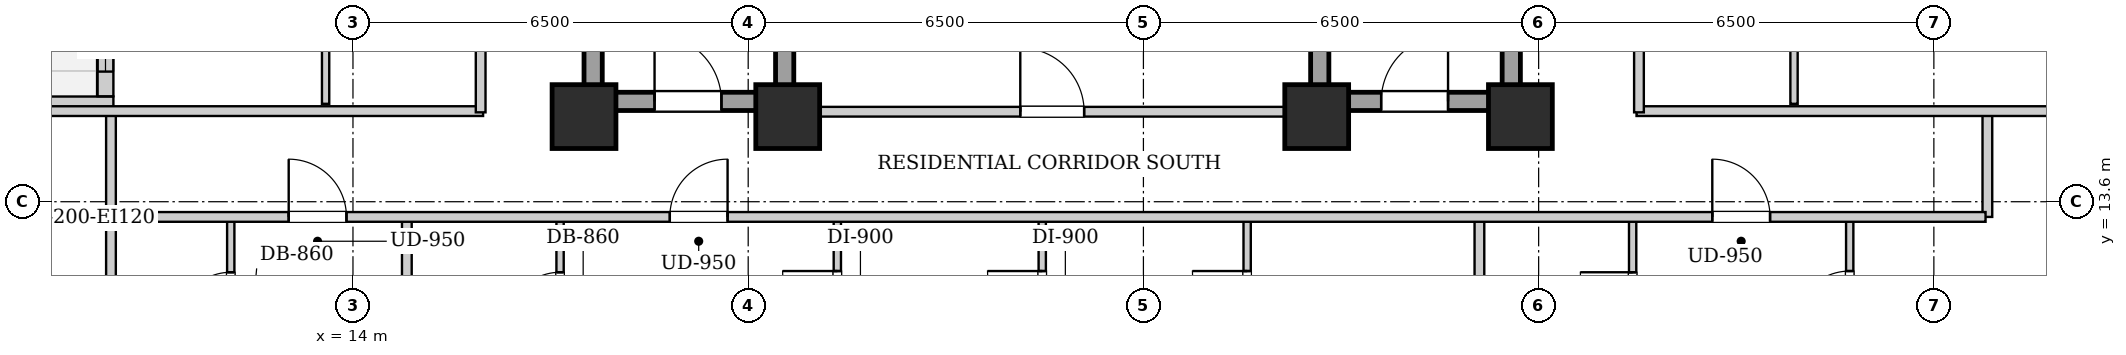
"""IFC4 building model, lengths in metres.
Left out: names, types, materials, properties, quantities, classifications, styles, units other than length and angle.
Written with IfcOpenShell. Run it as: python <this file> out.ifc"""

import sys

from ifc_helpers import new_model, si_unit, direction, frame, frame_2d, origin, origin_2d, place, context, subcontext, project, spatial, rectangle, extrude, element, fill, save


model = new_model("IFC4")
c1 = context("Model", 3, precision=1e-05, world=origin(), true_north=direction((0.0, 1.0)))
c2 = subcontext(c1, "Body", "Model", "MODEL_VIEW")
j1 = project(units=[si_unit("LENGTHUNIT", "METRE"), si_unit("PLANEANGLEUNIT", "RADIAN")], contexts=[c1])
p1 = place(None, origin())
s1 = spatial("IfcSite", under=j1, at=p1, CompositionType="ELEMENT")
p2 = place(p1, origin())
s2 = spatial("IfcBuilding", under=s1, at=p2, CompositionType="ELEMENT")
p3 = place(p2, frame((0.0, 0.0, 103.9)))
s3 = spatial("IfcBuildingStorey", under=s2, at=p3, CompositionType="ELEMENT", Elevation=103.9)
for number, where, z_axis, x_axis in (
    (1, (17.8, 15.0, 0.0), (0.0, 0.0, 1.0), (1.0, 0.0, 0.0)),
    (2, (21.15, 15.0, 0.0), (0.0, 0.0, 1.0), (1.0, 0.0, 0.0)),
    (3, (29.85, 15.0, 0.0), (0.0, 0.0, 1.0), (1.0, 0.0, 0.0)),
    (4, (33.2, 15.0, 0.0), (0.0, 0.0, 1.0), (1.0, 0.0, 0.0)),
):
    element("IfcColumn", number, at=place(p3, frame(where, z_axis=z_axis, x_axis=x_axis)), inside=s3, PredefinedType="COLUMN", context=c2, shape_type="SweptSolid", body=[
        extrude(rectangle(XDim=1.05, YDim=1.05, at=origin_2d()), origin(), (0.0, 0.0, 1.0), 3.2),
    ])
p4 = place(p3, frame((7.66, 15.2, 0.0), z_axis=(0.0, 0.0, 1.0), x_axis=(1.0, 0.0, 0.0)))
e5 = element("IfcWall", 5, at=p4, inside=s3, PredefinedType="SOLIDWALL", context=c2, shape_type="SweptSolid", body=[
    extrude(rectangle(XDim=2.4, YDim=0.26, at=frame_2d((1.2, 0.0))), origin(), (0.0, 0.0, 1.0), 2.94),
])
p5 = place(p3, frame((9.93, 15.334, 0.0), z_axis=(0.0, 0.0, 1.0), x_axis=(0.0, 1.0, 0.0)))
e6 = element("IfcWall", 6, at=p5, inside=s3, PredefinedType="SOLIDWALL", context=c2, shape_type="SweptSolid", body=[
    extrude(rectangle(XDim=3.932, YDim=0.26, at=frame_2d((1.966, 0.0))), origin(), (0.0, 0.0, 1.0), 2.94),
])
p6 = place(p5, frame((1.416, 0.0, 0.0)))
e7 = element("IfcOpeningElement", 7, at=p6, cuts=e6, PredefinedType="OPENING", context=c2, shape_type="SweptSolid", body=[
    extrude(rectangle(XDim=1.1, YDim=2.0, at=frame_2d((0.55, 1.0))), frame((0.0, 0.14, 0.0), z_axis=(0.0, -1.0, 0.0), x_axis=(1.0, 0.0, 0.0)), (0.0, 0.0, 1.0), 0.28),
])
p7 = place(p5, frame((0.406, 0.0, 0.55)))
e8 = element("IfcOpeningElement", 8, at=p7, cuts=e6, PredefinedType="OPENING", context=c2, shape_type="SweptSolid", body=[
    extrude(rectangle(XDim=0.85, YDim=1.2, at=frame_2d((0.425, 0.6))), frame((0.0, 0.14, 0.0), z_axis=(0.0, -1.0, 0.0), x_axis=(1.0, 0.0, 0.0)), (0.0, 0.0, 1.0), 0.28),
])
for number, where, z_axis, x_axis in (
    (9, (17.95, 15.1, 0.0), (0.0, 0.0, 1.0), (0.0, 1.0, 0.0)),
    (10, (21.1, 15.1, 0.0), (0.0, 0.0, 1.0), (0.0, 1.0, 0.0)),
):
    element("IfcWall", number, at=place(p3, frame(where, z_axis=z_axis, x_axis=x_axis)), inside=s3, PredefinedType="SHEAR", context=c2, shape_type="SweptSolid", body=[
        extrude(rectangle(XDim=9.0, YDim=0.3, at=frame_2d((4.5, 0.0))), origin(), (0.0, 0.0, 1.0), 2.94),
    ])
p8 = place(p3, frame((18.1, 15.25, 0.0), z_axis=(0.0, 0.0, 1.0), x_axis=(1.0, 0.0, 0.0)))
e11 = element("IfcWall", 11, at=p8, inside=s3, PredefinedType="SHEAR", context=c2, shape_type="SweptSolid", body=[
    extrude(rectangle(XDim=2.85, YDim=0.3, at=frame_2d((1.425, 0.0))), origin(), (0.0, 0.0, 1.0), 2.94),
])
p9 = place(p8, frame((0.86, 0.0, 0.0)))
e12 = element("IfcOpeningElement", 12, at=p9, cuts=e11, PredefinedType="OPENING", context=c2, shape_type="SweptSolid", body=[
    extrude(rectangle(XDim=1.1, YDim=2.05, at=frame_2d((0.55, 1.025))), frame((0.0, 0.16, 0.0), z_axis=(0.0, -1.0, 0.0), x_axis=(1.0, 0.0, 0.0)), (0.0, 0.0, 1.0), 0.32),
])
for number, where, z_axis, x_axis in (
    (13, (29.9, 15.1, 0.0), (0.0, 0.0, 1.0), (0.0, 1.0, 0.0)),
    (14, (33.05, 15.1, 0.0), (0.0, 0.0, 1.0), (0.0, 1.0, 0.0)),
):
    element("IfcWall", number, at=place(p3, frame(where, z_axis=z_axis, x_axis=x_axis)), inside=s3, PredefinedType="SHEAR", context=c2, shape_type="SweptSolid", body=[
        extrude(rectangle(XDim=9.0, YDim=0.3, at=frame_2d((4.5, 0.0))), origin(), (0.0, 0.0, 1.0), 2.94),
    ])
p10 = place(p3, frame((30.05, 15.25, 0.0), z_axis=(0.0, 0.0, 1.0), x_axis=(1.0, 0.0, 0.0)))
e15 = element("IfcWall", 15, at=p10, inside=s3, PredefinedType="SHEAR", context=c2, shape_type="SweptSolid", body=[
    extrude(rectangle(XDim=2.85, YDim=0.3, at=frame_2d((1.425, 0.0))), origin(), (0.0, 0.0, 1.0), 2.94),
])
p11 = place(p10, frame((0.86, 0.0, 0.0)))
e16 = element("IfcOpeningElement", 16, at=p11, cuts=e15, PredefinedType="OPENING", context=c2, shape_type="SweptSolid", body=[
    extrude(rectangle(XDim=1.1, YDim=2.05, at=frame_2d((0.55, 1.025))), frame((0.0, 0.16, 0.0), z_axis=(0.0, -1.0, 0.0), x_axis=(1.0, 0.0, 0.0)), (0.0, 0.0, 1.0), 0.32),
])
p12 = place(p3, frame((21.25, 15.08, 0.0), z_axis=(0.0, 0.0, 1.0), x_axis=(1.0, 0.0, 0.0)))
e17 = element("IfcWall", 17, at=p12, inside=s3, PredefinedType="PARTITIONING", context=c2, shape_type="SweptSolid", body=[
    extrude(rectangle(XDim=8.5, YDim=0.16, at=frame_2d((4.25, 0.0))), origin(), (0.0, 0.0, 1.0), 2.313),
])
p13 = place(p12, frame((3.725, 0.0, 0.0)))
e18 = element("IfcOpeningElement", 18, at=p13, cuts=e17, PredefinedType="OPENING", context=c2, shape_type="SweptSolid", body=[
    extrude(rectangle(XDim=1.05, YDim=2.05, at=frame_2d((0.525, 1.025))), frame((0.0, 0.09, 0.0), z_axis=(0.0, -1.0, 0.0), x_axis=(1.0, 0.0, 0.0)), (0.0, 0.0, 1.0), 0.18),
])
for number, where, z_axis, x_axis in (
    (19, (10.02, 13.35, 0.0), (0.0, 0.0, 1.0), (0.0, 1.0, 0.0)),
    (20, (40.88, 13.35, 0.0), (0.0, 0.0, 1.0), (0.0, 1.0, 0.0)),
):
    element("IfcWall", number, at=place(p3, frame(where, z_axis=z_axis, x_axis=x_axis)), inside=s3, PredefinedType="PARTITIONING", context=c2, shape_type="SweptSolid", body=[
        extrude(rectangle(XDim=1.74, YDim=0.16, at=frame_2d((0.87, 0.0))), origin(), (0.0, 0.0, 1.0), 2.94),
    ])
p14 = place(p3, frame((7.78, 15.09, 0.0), z_axis=(0.0, 0.0, 1.0), x_axis=(1.0, 0.0, 0.0)))
e21 = element("IfcWall", 21, at=p14, inside=s3, PredefinedType="PARTITIONING", context=c2, shape_type="SweptSolid", body=[
    extrude(rectangle(XDim=8.36, YDim=0.16, at=frame_2d((4.18, 0.0))), origin(), (0.0, 0.0, 1.0), 2.313),
])
p15 = place(p3, frame((35.11, 15.09, 0.0), z_axis=(0.0, 0.0, 1.0), x_axis=(1.0, 0.0, 0.0)))
e22 = element("IfcWall", 22, at=p15, inside=s3, PredefinedType="PARTITIONING", context=c2, shape_type="SweptSolid", body=[
    extrude(rectangle(XDim=8.01, YDim=0.16, at=frame_2d((4.005, 0.0))), origin(), (0.0, 0.0, 1.0), 2.313),
])
p16 = place(p3, frame((10.02, 10.65, 0.0), z_axis=(0.0, 0.0, 1.0), x_axis=(0.0, 1.0, 0.0)))
e23 = element("IfcWall", 23, at=p16, inside=s3, PredefinedType="PARTITIONING", context=c2, shape_type="SweptSolid", body=[
    extrude(rectangle(XDim=2.66, YDim=0.16, at=frame_2d((1.33, 0.0))), origin(), (0.0, 0.0, 1.0), 2.94),
])
p17 = place(p3, frame((11.99, 10.71, 0.0), z_axis=(0.0, 0.0, 1.0), x_axis=(0.0, 1.0, 0.0)))
e24 = element("IfcWall", 24, at=p17, inside=s3, PredefinedType="PARTITIONING", context=c2, shape_type="SweptSolid", body=[
    extrude(rectangle(XDim=2.6, YDim=0.12, at=frame_2d((1.3, 0.0))), origin(), (0.0, 0.0, 1.0), 2.94),
])
p18 = place(p17, frame((0.87, 0.0, 0.0)))
e25 = element("IfcOpeningElement", 25, at=p18, cuts=e24, PredefinedType="OPENING", context=c2, shape_type="SweptSolid", body=[
    extrude(rectangle(XDim=0.86, YDim=2.05, at=frame_2d((0.43, 1.025))), frame((0.0, 0.07, 0.0), z_axis=(0.0, -1.0, 0.0), x_axis=(1.0, 0.0, 0.0)), (0.0, 0.0, 1.0), 0.14),
])
p19 = place(p3, frame((14.886, 2.26, 0.0), z_axis=(0.0, 0.0, 1.0), x_axis=(0.0, 1.0, 0.0)))
e26 = element("IfcWall", 26, at=p19, inside=s3, PredefinedType="PARTITIONING", context=c2, shape_type="SweptSolid", body=[
    extrude(rectangle(XDim=11.05, YDim=0.16, at=frame_2d((5.525, 0.0))), origin(), (0.0, 0.0, 1.0), 2.94),
])
p20 = place(p3, frame((17.406, 10.71, 0.0), z_axis=(0.0, 0.0, 1.0), x_axis=(0.0, 1.0, 0.0)))
e27 = element("IfcWall", 27, at=p20, inside=s3, PredefinedType="PARTITIONING", context=c2, shape_type="SweptSolid", body=[
    extrude(rectangle(XDim=2.6, YDim=0.12, at=frame_2d((1.3, 0.0))), origin(), (0.0, 0.0, 1.0), 2.94),
])
p21 = place(p20, frame((0.87, 0.0, 0.0)))
e28 = element("IfcOpeningElement", 28, at=p21, cuts=e27, PredefinedType="OPENING", context=c2, shape_type="SweptSolid", body=[
    extrude(rectangle(XDim=0.86, YDim=2.05, at=frame_2d((0.43, 1.025))), frame((0.0, 0.07, 0.0), z_axis=(0.0, -1.0, 0.0), x_axis=(1.0, 0.0, 0.0)), (0.0, 0.0, 1.0), 0.14),
])
p22 = place(p3, frame((21.966, 10.71, 0.0), z_axis=(0.0, 0.0, 1.0), x_axis=(0.0, 1.0, 0.0)))
e29 = element("IfcWall", 29, at=p22, inside=s3, PredefinedType="PARTITIONING", context=c2, shape_type="SweptSolid", body=[
    extrude(rectangle(XDim=2.6, YDim=0.12, at=frame_2d((1.3, 0.0))), origin(), (0.0, 0.0, 1.0), 2.94),
])
p23 = place(p22, frame((0.85, 0.0, 0.0)))
e30 = element("IfcOpeningElement", 30, at=p23, cuts=e29, PredefinedType="OPENING", context=c2, shape_type="SweptSolid", body=[
    extrude(rectangle(XDim=0.9, YDim=2.05, at=frame_2d((0.45, 1.025))), frame((0.0, 0.07, 0.0), z_axis=(0.0, -1.0, 0.0), x_axis=(1.0, 0.0, 0.0)), (0.0, 0.0, 1.0), 0.14),
])
p24 = place(p3, frame((25.336, 10.71, 0.0), z_axis=(0.0, 0.0, 1.0), x_axis=(0.0, 1.0, 0.0)))
e31 = element("IfcWall", 31, at=p24, inside=s3, PredefinedType="PARTITIONING", context=c2, shape_type="SweptSolid", body=[
    extrude(rectangle(XDim=2.6, YDim=0.12, at=frame_2d((1.3, 0.0))), origin(), (0.0, 0.0, 1.0), 2.94),
])
p25 = place(p24, frame((0.85, 0.0, 0.0)))
e32 = element("IfcOpeningElement", 32, at=p25, cuts=e31, PredefinedType="OPENING", context=c2, shape_type="SweptSolid", body=[
    extrude(rectangle(XDim=0.9, YDim=2.05, at=frame_2d((0.45, 1.025))), frame((0.0, 0.07, 0.0), z_axis=(0.0, -1.0, 0.0), x_axis=(1.0, 0.0, 0.0)), (0.0, 0.0, 1.0), 0.14),
])
p26 = place(p3, frame((28.706, 10.71, 0.0), z_axis=(0.0, 0.0, 1.0), x_axis=(0.0, 1.0, 0.0)))
e33 = element("IfcWall", 33, at=p26, inside=s3, PredefinedType="PARTITIONING", context=c2, shape_type="SweptSolid", body=[
    extrude(rectangle(XDim=2.6, YDim=0.12, at=frame_2d((1.3, 0.0))), origin(), (0.0, 0.0, 1.0), 2.94),
])
p27 = place(p26, frame((0.85, 0.0, 0.0)))
e34 = element("IfcOpeningElement", 34, at=p27, cuts=e33, PredefinedType="OPENING", context=c2, shape_type="SweptSolid", body=[
    extrude(rectangle(XDim=0.9, YDim=2.05, at=frame_2d((0.45, 1.025))), frame((0.0, 0.07, 0.0), z_axis=(0.0, -1.0, 0.0), x_axis=(1.0, 0.0, 0.0)), (0.0, 0.0, 1.0), 0.14),
])
p28 = place(p3, frame((32.526, 0.28, 0.0), z_axis=(0.0, 0.0, 1.0), x_axis=(0.0, 1.0, 0.0)))
e35 = element("IfcWall", 35, at=p28, inside=s3, PredefinedType="PARTITIONING", context=c2, shape_type="SweptSolid", body=[
    extrude(rectangle(XDim=13.03, YDim=0.16, at=frame_2d((6.515, 0.0))), origin(), (0.0, 0.0, 1.0), 2.94),
])
p29 = place(p3, frame((35.046, 10.71, 0.0), z_axis=(0.0, 0.0, 1.0), x_axis=(0.0, 1.0, 0.0)))
e36 = element("IfcWall", 36, at=p29, inside=s3, PredefinedType="PARTITIONING", context=c2, shape_type="SweptSolid", body=[
    extrude(rectangle(XDim=2.6, YDim=0.12, at=frame_2d((1.3, 0.0))), origin(), (0.0, 0.0, 1.0), 2.94),
])
p30 = place(p29, frame((0.87, 0.0, 0.0)))
e37 = element("IfcOpeningElement", 37, at=p30, cuts=e36, PredefinedType="OPENING", context=c2, shape_type="SweptSolid", body=[
    extrude(rectangle(XDim=0.86, YDim=2.05, at=frame_2d((0.43, 1.025))), frame((0.0, 0.07, 0.0), z_axis=(0.0, -1.0, 0.0), x_axis=(1.0, 0.0, 0.0)), (0.0, 0.0, 1.0), 0.14),
])
p31 = place(p3, frame((38.616, 10.71, 0.0), z_axis=(0.0, 0.0, 1.0), x_axis=(0.0, 1.0, 0.0)))
e38 = element("IfcWall", 38, at=p31, inside=s3, PredefinedType="PARTITIONING", context=c2, shape_type="SweptSolid", body=[
    extrude(rectangle(XDim=2.6, YDim=0.12, at=frame_2d((1.3, 0.0))), origin(), (0.0, 0.0, 1.0), 2.94),
])
p32 = place(p31, frame((0.85, 0.0, 0.0)))
e39 = element("IfcOpeningElement", 39, at=p32, cuts=e38, PredefinedType="OPENING", context=c2, shape_type="SweptSolid", body=[
    extrude(rectangle(XDim=0.9, YDim=2.05, at=frame_2d((0.45, 1.025))), frame((0.0, 0.07, 0.0), z_axis=(0.0, -1.0, 0.0), x_axis=(1.0, 0.0, 0.0)), (0.0, 0.0, 1.0), 0.14),
])
p33 = place(p3, frame((13.55, 15.21, 0.0), z_axis=(0.0, 0.0, 1.0), x_axis=(0.0, 1.0, 0.0)))
e40 = element("IfcWall", 40, at=p33, inside=s3, PredefinedType="PARTITIONING", context=c2, shape_type="SweptSolid", body=[
    extrude(rectangle(XDim=2.3, YDim=0.12, at=frame_2d((1.15, 0.0))), origin(), (0.0, 0.0, 1.0), 2.94),
])
p34 = place(p3, frame((37.7, 15.21, 0.0), z_axis=(0.0, 0.0, 1.0), x_axis=(0.0, 1.0, 0.0)))
e41 = element("IfcWall", 41, at=p34, inside=s3, PredefinedType="PARTITIONING", context=c2, shape_type="SweptSolid", body=[
    extrude(rectangle(XDim=1.85, YDim=0.12, at=frame_2d((0.925, 0.0))), origin(), (0.0, 0.0, 1.0), 2.94),
])
p35 = place(p3, frame((10.05, 13.35, 0.0), z_axis=(0.0, 0.0, 1.0), x_axis=(1.0, 0.0, 0.0)))
e42 = element("IfcWall", 42, at=p35, inside=s3, PredefinedType="PARTITIONING", context=c2, shape_type="SweptSolid", body=[
    extrude(rectangle(XDim=30.8, YDim=0.16, at=frame_2d((15.4, 0.0))), origin(), (0.0, 0.0, 1.0), 2.94),
])
p36 = place(p35, frame((2.893, 0.0, 0.0)))
e43 = element("IfcOpeningElement", 43, at=p36, cuts=e42, PredefinedType="OPENING", context=c2, shape_type="SweptSolid", body=[
    extrude(rectangle(XDim=0.95, YDim=2.1, at=frame_2d((0.475, 1.05))), frame((0.0, 0.09, 0.0), z_axis=(0.0, -1.0, 0.0), x_axis=(1.0, 0.0, 0.0)), (0.0, 0.0, 1.0), 0.18),
])
p37 = place(p35, frame((9.161, 0.0, 0.0)))
e44 = element("IfcOpeningElement", 44, at=p37, cuts=e42, PredefinedType="OPENING", context=c2, shape_type="SweptSolid", body=[
    extrude(rectangle(XDim=0.95, YDim=2.1, at=frame_2d((0.475, 1.05))), frame((0.0, 0.09, 0.0), z_axis=(0.0, -1.0, 0.0), x_axis=(1.0, 0.0, 0.0)), (0.0, 0.0, 1.0), 0.18),
])
p38 = place(p35, frame((26.306, 0.0, 0.0)))
e45 = element("IfcOpeningElement", 45, at=p38, cuts=e42, PredefinedType="OPENING", context=c2, shape_type="SweptSolid", body=[
    extrude(rectangle(XDim=0.95, YDim=2.1, at=frame_2d((0.475, 1.05))), frame((0.0, 0.09, 0.0), z_axis=(0.0, -1.0, 0.0), x_axis=(1.0, 0.0, 0.0)), (0.0, 0.0, 1.0), 0.18),
])
p39 = place(p3, frame((16.1, 15.07, 0.0), z_axis=(0.0, 0.0, 1.0), x_axis=(0.0, 1.0, 0.0)))
e46 = element("IfcWall", 46, at=p39, inside=s3, PredefinedType="PARTITIONING", context=c2, shape_type="SweptSolid", body=[
    extrude(rectangle(XDim=13.93, YDim=0.16, at=frame_2d((6.965, 0.0))), origin(), (0.0, 0.0, 1.0), 2.94),
])
p40 = place(p39, frame((4.385, 0.0, 0.0)))
e47 = element("IfcOpeningElement", 47, at=p40, cuts=e46, PredefinedType="OPENING", context=c2, shape_type="SweptSolid", body=[
    extrude(rectangle(XDim=0.95, YDim=2.1, at=frame_2d((0.475, 1.05))), frame((0.0, 0.09, 0.0), z_axis=(0.0, -1.0, 0.0), x_axis=(1.0, 0.0, 0.0)), (0.0, 0.0, 1.0), 0.18),
])
p41 = place(p3, frame((35.15, 15.07, 0.0), z_axis=(0.0, 0.0, 1.0), x_axis=(0.0, 1.0, 0.0)))
e48 = element("IfcWall", 48, at=p41, inside=s3, PredefinedType="PARTITIONING", context=c2, shape_type="SweptSolid", body=[
    extrude(rectangle(XDim=13.93, YDim=0.16, at=frame_2d((6.965, 0.0))), origin(), (0.0, 0.0, 1.0), 2.94),
])
p42 = place(p41, frame((3.608, 0.0, 0.0)))
e49 = element("IfcOpeningElement", 49, at=p42, cuts=e48, PredefinedType="OPENING", context=c2, shape_type="SweptSolid", body=[
    extrude(rectangle(XDim=0.95, YDim=2.1, at=frame_2d((0.475, 1.05))), frame((0.0, 0.09, 0.0), z_axis=(0.0, -1.0, 0.0), x_axis=(1.0, 0.0, 0.0)), (0.0, 0.0, 1.0), 0.18),
])
p43 = place(p41, frame((10.649, 0.0, 0.0)))
e50 = element("IfcOpeningElement", 50, at=p43, cuts=e48, PredefinedType="OPENING", context=c2, shape_type="SweptSolid", body=[
    extrude(rectangle(XDim=0.95, YDim=2.1, at=frame_2d((0.475, 1.05))), frame((0.0, 0.09, 0.0), z_axis=(0.0, -1.0, 0.0), x_axis=(1.0, 0.0, 0.0)), (0.0, 0.0, 1.0), 0.18),
])
p44 = place(p9, origin())
e51 = element("IfcDoor", 51, at=p44, inside=s3, OperationType="SINGLE_SWING_LEFT", PredefinedType="DOOR", context=c2, shape_type="SweptSolid", body=[
    extrude(rectangle(XDim=1.1, YDim=2.05, at=frame_2d((0.55, 1.025))), frame((0.0, 0.025, 0.0), z_axis=(0.0, -1.0, 0.0), x_axis=(1.0, 0.0, 0.0)), (0.0, 0.0, 1.0), 0.05),
])
fill(e12, e51)
p45 = place(p11, origin())
e52 = element("IfcDoor", 52, at=p45, inside=s3, OperationType="SINGLE_SWING_RIGHT", PredefinedType="DOOR", context=c2, shape_type="SweptSolid", body=[
    extrude(rectangle(XDim=1.1, YDim=2.05, at=frame_2d((0.55, 1.025))), frame((0.0, 0.025, 0.0), z_axis=(0.0, -1.0, 0.0), x_axis=(1.0, 0.0, 0.0)), (0.0, 0.0, 1.0), 0.05),
])
fill(e16, e52)
p46 = place(p13, origin())
e53 = element("IfcDoor", 53, at=p46, inside=s3, OperationType="SINGLE_SWING_LEFT", PredefinedType="DOOR", context=c2, shape_type="SweptSolid", body=[
    extrude(rectangle(XDim=1.05, YDim=2.05, at=frame_2d((0.525, 1.025))), frame((0.0, 0.025, 0.0), z_axis=(0.0, -1.0, 0.0), x_axis=(1.0, 0.0, 0.0)), (0.0, 0.0, 1.0), 0.05),
])
fill(e18, e53)
p47 = place(p18, origin())
e54 = element("IfcDoor", 54, at=p47, inside=s3, OperationType="SINGLE_SWING_LEFT", PredefinedType="DOOR", context=c2, shape_type="SweptSolid", body=[
    extrude(rectangle(XDim=0.86, YDim=2.05, at=frame_2d((0.43, 1.025))), frame((0.0, 0.025, 0.0), z_axis=(0.0, -1.0, 0.0), x_axis=(1.0, 0.0, 0.0)), (0.0, 0.0, 1.0), 0.05),
])
fill(e25, e54)
p48 = place(p21, origin())
e55 = element("IfcDoor", 55, at=p48, inside=s3, OperationType="SINGLE_SWING_LEFT", PredefinedType="DOOR", context=c2, shape_type="SweptSolid", body=[
    extrude(rectangle(XDim=0.86, YDim=2.05, at=frame_2d((0.43, 1.025))), frame((0.0, 0.025, 0.0), z_axis=(0.0, -1.0, 0.0), x_axis=(1.0, 0.0, 0.0)), (0.0, 0.0, 1.0), 0.05),
])
fill(e28, e55)
p49 = place(p23, origin())
e56 = element("IfcDoor", 56, at=p49, inside=s3, OperationType="SINGLE_SWING_RIGHT", PredefinedType="DOOR", context=c2, shape_type="SweptSolid", body=[
    extrude(rectangle(XDim=0.9, YDim=2.05, at=frame_2d((0.45, 1.025))), frame((0.0, 0.025, 0.0), z_axis=(0.0, -1.0, 0.0), x_axis=(1.0, 0.0, 0.0)), (0.0, 0.0, 1.0), 0.05),
])
fill(e30, e56)
p50 = place(p25, origin())
e57 = element("IfcDoor", 57, at=p50, inside=s3, OperationType="SINGLE_SWING_RIGHT", PredefinedType="DOOR", context=c2, shape_type="SweptSolid", body=[
    extrude(rectangle(XDim=0.9, YDim=2.05, at=frame_2d((0.45, 1.025))), frame((0.0, 0.025, 0.0), z_axis=(0.0, -1.0, 0.0), x_axis=(1.0, 0.0, 0.0)), (0.0, 0.0, 1.0), 0.05),
])
fill(e32, e57)
p51 = place(p27, origin())
e58 = element("IfcDoor", 58, at=p51, inside=s3, OperationType="SINGLE_SWING_RIGHT", PredefinedType="DOOR", context=c2, shape_type="SweptSolid", body=[
    extrude(rectangle(XDim=0.9, YDim=2.05, at=frame_2d((0.45, 1.025))), frame((0.0, 0.025, 0.0), z_axis=(0.0, -1.0, 0.0), x_axis=(1.0, 0.0, 0.0)), (0.0, 0.0, 1.0), 0.05),
])
fill(e34, e58)
p52 = place(p30, origin())
e59 = element("IfcDoor", 59, at=p52, inside=s3, OperationType="SINGLE_SWING_RIGHT", PredefinedType="DOOR", context=c2, shape_type="SweptSolid", body=[
    extrude(rectangle(XDim=0.86, YDim=2.05, at=frame_2d((0.43, 1.025))), frame((0.0, 0.025, 0.0), z_axis=(0.0, -1.0, 0.0), x_axis=(1.0, 0.0, 0.0)), (0.0, 0.0, 1.0), 0.05),
])
fill(e37, e59)
p53 = place(p32, origin())
e60 = element("IfcDoor", 60, at=p53, inside=s3, OperationType="SINGLE_SWING_LEFT", PredefinedType="DOOR", context=c2, shape_type="SweptSolid", body=[
    extrude(rectangle(XDim=0.9, YDim=2.05, at=frame_2d((0.45, 1.025))), frame((0.0, 0.025, 0.0), z_axis=(0.0, -1.0, 0.0), x_axis=(1.0, 0.0, 0.0)), (0.0, 0.0, 1.0), 0.05),
])
fill(e39, e60)
p54 = place(p36, origin())
e61 = element("IfcDoor", 61, at=p54, inside=s3, OperationType="SINGLE_SWING_LEFT", PredefinedType="DOOR", context=c2, shape_type="SweptSolid", body=[
    extrude(rectangle(XDim=0.95, YDim=2.1, at=frame_2d((0.475, 1.05))), frame((0.0, 0.025, 0.0), z_axis=(0.0, -1.0, 0.0), x_axis=(1.0, 0.0, 0.0)), (0.0, 0.0, 1.0), 0.05),
])
fill(e43, e61)
p55 = place(p37, origin())
e62 = element("IfcDoor", 62, at=p55, inside=s3, OperationType="SINGLE_SWING_RIGHT", PredefinedType="DOOR", context=c2, shape_type="SweptSolid", body=[
    extrude(rectangle(XDim=0.95, YDim=2.1, at=frame_2d((0.475, 1.05))), frame((0.0, 0.025, 0.0), z_axis=(0.0, -1.0, 0.0), x_axis=(1.0, 0.0, 0.0)), (0.0, 0.0, 1.0), 0.05),
])
fill(e44, e62)
p56 = place(p38, origin())
e63 = element("IfcDoor", 63, at=p56, inside=s3, OperationType="SINGLE_SWING_LEFT", PredefinedType="DOOR", context=c2, shape_type="SweptSolid", body=[
    extrude(rectangle(XDim=0.95, YDim=2.1, at=frame_2d((0.475, 1.05))), frame((0.0, 0.025, 0.0), z_axis=(0.0, -1.0, 0.0), x_axis=(1.0, 0.0, 0.0)), (0.0, 0.0, 1.0), 0.05),
])
fill(e45, e63)
p57 = place(p7, origin())
e64 = element("IfcWindow", 64, at=p57, inside=s3, PartitioningType="SINGLE_PANEL", PredefinedType="WINDOW", context=c2, shape_type="SweptSolid", body=[
    extrude(rectangle(XDim=0.85, YDim=1.2, at=frame_2d((0.425, 0.6))), frame((0.0, 0.03, 0.0), z_axis=(0.0, -1.0, 0.0), x_axis=(1.0, 0.0, 0.0)), (0.0, 0.0, 1.0), 0.06),
])
fill(e8, e64)
save(model, sys.argv[1])
